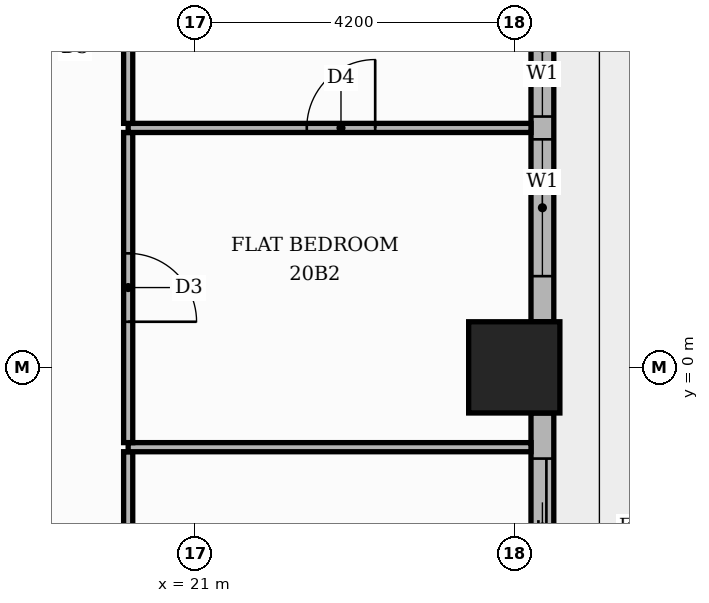
"""IFC4 building model, lengths in metres.
Left out: names, types, materials, properties, quantities, classifications, styles, units other than length and angle.
Written with IfcOpenShell. Run it as: python <this file> out.ifc"""

import sys

from ifc_helpers import new_model, si_unit, direction, frame, frame_2d, origin, origin_2d, place, context, subcontext, project, spatial, rectangle, extrude, element, fill, save


model = new_model("IFC4")
c1 = context("Model", 3, precision=1e-05, world=origin(), true_north=direction((0.0, 1.0)))
c2 = subcontext(c1, "Body", "Model", "MODEL_VIEW")
j1 = project(units=[si_unit("LENGTHUNIT", "METRE"), si_unit("PLANEANGLEUNIT", "RADIAN")], contexts=[c1])
p1 = place(None, origin())
s1 = spatial("IfcSite", under=j1, at=p1, CompositionType="ELEMENT")
p2 = place(p1, origin())
s2 = spatial("IfcBuilding", under=s1, at=p2, CompositionType="ELEMENT")
p3 = place(p2, frame((0.0, 0.0, 87.0)))
s3 = spatial("IfcBuildingStorey", under=s2, at=p3, CompositionType="ELEMENT", Elevation=87.0)
p4 = place(p3, frame((25.2, 0.0, 0.0), z_axis=(0.0, 0.0, 1.0), x_axis=(1.0, 0.0, 0.0)))
e1 = element("IfcColumn", 1, at=p4, inside=s3, PredefinedType="COLUMN", context=c2, shape_type="SweptSolid", body=[
    extrude(rectangle(XDim=1.2, YDim=1.2, at=origin_2d()), origin(), (0.0, 0.0, 1.0), 3.9),
])
p5 = place(p3, frame((25.57, -7.8, 0.0), z_axis=(0.0, 0.0, 1.0), x_axis=(0.0, 1.0, 0.0)))
e2 = element("IfcWall", 2, at=p5, inside=s3, PredefinedType="STANDARD", context=c2, shape_type="SweptSolid", body=[
    extrude(rectangle(XDim=7.2, YDim=0.3, at=frame_2d((3.6, 0.0))), origin(), (0.0, 0.0, 1.0), 3.48),
])
p6 = place(p5, frame((0.6, 0.0, 0.9)))
e3 = element("IfcOpeningElement", 3, at=p6, cuts=e2, PredefinedType="OPENING", context=c2, shape_type="SweptSolid", body=[
    extrude(rectangle(XDim=1.8, YDim=2.1, at=frame_2d((0.9, 1.05))), frame((0.0, 0.16, 0.0), z_axis=(0.0, -1.0, 0.0), x_axis=(1.0, 0.0, 0.0)), (0.0, 0.0, 1.0), 0.32),
])
p7 = place(p5, frame((2.7, 0.0, 0.9)))
e4 = element("IfcOpeningElement", 4, at=p7, cuts=e2, PredefinedType="OPENING", context=c2, shape_type="SweptSolid", body=[
    extrude(rectangle(XDim=1.8, YDim=2.1, at=frame_2d((0.9, 1.05))), frame((0.0, 0.16, 0.0), z_axis=(0.0, -1.0, 0.0), x_axis=(1.0, 0.0, 0.0)), (0.0, 0.0, 1.0), 0.32),
])
p8 = place(p5, frame((4.8, 0.0, 0.0)))
e5 = element("IfcOpeningElement", 5, at=p8, cuts=e2, PredefinedType="OPENING", context=c2, shape_type="SweptSolid", body=[
    extrude(rectangle(XDim=1.8, YDim=2.4, at=frame_2d((0.9, 1.2))), frame((0.0, 0.16, 0.0), z_axis=(0.0, -1.0, 0.0), x_axis=(1.0, 0.0, 0.0)), (0.0, 0.0, 1.0), 0.32),
])
p9 = place(p3, frame((25.57, 0.6, 0.0), z_axis=(0.0, 0.0, 1.0), x_axis=(0.0, 1.0, 0.0)))
e6 = element("IfcWall", 6, at=p9, inside=s3, PredefinedType="STANDARD", context=c2, shape_type="SweptSolid", body=[
    extrude(rectangle(XDim=7.2, YDim=0.3, at=frame_2d((3.6, 0.0))), origin(), (0.0, 0.0, 1.0), 3.48),
])
p10 = place(p9, frame((0.6, 0.0, 0.9)))
e7 = element("IfcOpeningElement", 7, at=p10, cuts=e6, PredefinedType="OPENING", context=c2, shape_type="SweptSolid", body=[
    extrude(rectangle(XDim=1.8, YDim=2.1, at=frame_2d((0.9, 1.05))), frame((0.0, 0.16, 0.0), z_axis=(0.0, -1.0, 0.0), x_axis=(1.0, 0.0, 0.0)), (0.0, 0.0, 1.0), 0.32),
])
p11 = place(p9, frame((2.7, 0.0, 0.9)))
e8 = element("IfcOpeningElement", 8, at=p11, cuts=e6, PredefinedType="OPENING", context=c2, shape_type="SweptSolid", body=[
    extrude(rectangle(XDim=1.8, YDim=2.1, at=frame_2d((0.9, 1.05))), frame((0.0, 0.16, 0.0), z_axis=(0.0, -1.0, 0.0), x_axis=(1.0, 0.0, 0.0)), (0.0, 0.0, 1.0), 0.32),
])
p12 = place(p9, frame((4.8, 0.0, 0.0)))
e9 = element("IfcOpeningElement", 9, at=p12, cuts=e6, PredefinedType="OPENING", context=c2, shape_type="SweptSolid", body=[
    extrude(rectangle(XDim=1.8, YDim=2.4, at=frame_2d((0.9, 1.2))), frame((0.0, 0.16, 0.0), z_axis=(0.0, -1.0, 0.0), x_axis=(1.0, 0.0, 0.0)), (0.0, 0.0, 1.0), 0.32),
])
p13 = place(p3, frame((20.12, -5.15, 0.0), z_axis=(0.0, 0.0, 1.0), x_axis=(0.0, 1.0, 0.0)))
e10 = element("IfcWall", 10, at=p13, inside=s3, PredefinedType="PARTITIONING", context=c2, shape_type="SweptSolid", body=[
    extrude(rectangle(XDim=4.04, YDim=0.12, at=frame_2d((2.02, 0.0))), origin(), (0.0, 0.0, 1.0), 3.48),
])
p14 = place(p13, frame((1.5, 0.0, 0.0)))
e11 = element("IfcOpeningElement", 11, at=p14, cuts=e10, PredefinedType="OPENING", context=c2, shape_type="SweptSolid", body=[
    extrude(rectangle(XDim=1.0, YDim=2.1, at=frame_2d((0.5, 1.05))), frame((0.0, 0.07, 0.0), z_axis=(0.0, -1.0, 0.0), x_axis=(1.0, 0.0, 0.0)), (0.0, 0.0, 1.0), 0.14),
])
p15 = place(p3, frame((20.12, -1.05, 0.0), z_axis=(0.0, 0.0, 1.0), x_axis=(1.0, 0.0, 0.0)))
e12 = element("IfcWall", 12, at=p15, inside=s3, PredefinedType="PARTITIONING", context=c2, shape_type="SweptSolid", body=[
    extrude(rectangle(XDim=5.3, YDim=0.12, at=frame_2d((2.65, 0.0))), origin(), (0.0, 0.0, 1.0), 3.48),
])
p16 = place(p3, frame((20.12, -0.99, 0.0), z_axis=(0.0, 0.0, 1.0), x_axis=(0.0, 1.0, 0.0)))
e13 = element("IfcWall", 13, at=p16, inside=s3, PredefinedType="PARTITIONING", context=c2, shape_type="SweptSolid", body=[
    extrude(rectangle(XDim=4.08, YDim=0.12, at=frame_2d((2.04, 0.0))), origin(), (0.0, 0.0, 1.0), 3.48),
])
p17 = place(p16, frame((1.59, 0.0, 0.0)))
e14 = element("IfcOpeningElement", 14, at=p17, cuts=e13, PredefinedType="OPENING", context=c2, shape_type="SweptSolid", body=[
    extrude(rectangle(XDim=0.9, YDim=2.1, at=frame_2d((0.45, 1.05))), frame((0.0, 0.07, 0.0), z_axis=(0.0, -1.0, 0.0), x_axis=(1.0, 0.0, 0.0)), (0.0, 0.0, 1.0), 0.14),
])
p18 = place(p3, frame((20.12, 3.15, 0.0), z_axis=(0.0, 0.0, 1.0), x_axis=(1.0, 0.0, 0.0)))
e15 = element("IfcWall", 15, at=p18, inside=s3, PredefinedType="PARTITIONING", context=c2, shape_type="SweptSolid", body=[
    extrude(rectangle(XDim=5.3, YDim=0.12, at=frame_2d((2.65, 0.0))), origin(), (0.0, 0.0, 1.0), 3.48),
])
p19 = place(p18, frame((2.35, 0.0, 0.0)))
e16 = element("IfcOpeningElement", 16, at=p19, cuts=e15, PredefinedType="OPENING", context=c2, shape_type="SweptSolid", body=[
    extrude(rectangle(XDim=0.9, YDim=2.1, at=frame_2d((0.45, 1.05))), frame((0.0, 0.07, 0.0), z_axis=(0.0, -1.0, 0.0), x_axis=(1.0, 0.0, 0.0)), (0.0, 0.0, 1.0), 0.14),
])
p20 = place(p3, frame((20.12, 3.21, 0.0), z_axis=(0.0, 0.0, 1.0), x_axis=(0.0, 1.0, 0.0)))
e17 = element("IfcWall", 17, at=p20, inside=s3, PredefinedType="PARTITIONING", context=c2, shape_type="SweptSolid", body=[
    extrude(rectangle(XDim=1.98, YDim=0.12, at=frame_2d((0.99, 0.0))), origin(), (0.0, 0.0, 1.0), 3.48),
])
p21 = place(p8, origin())
e18 = element("IfcDoor", 18, at=p21, inside=s3, OperationType="SLIDING_TO_RIGHT", PredefinedType="DOOR", context=c2, shape_type="SweptSolid", body=[
    extrude(rectangle(XDim=1.8, YDim=2.4, at=frame_2d((0.9, 1.2))), frame((0.0, 0.025, 0.0), z_axis=(0.0, -1.0, 0.0), x_axis=(1.0, 0.0, 0.0)), (0.0, 0.0, 1.0), 0.05),
])
fill(e5, e18)
p22 = place(p10, origin())
e19 = element("IfcWindow", 19, at=p22, inside=s3, PartitioningType="SINGLE_PANEL", PredefinedType="WINDOW", context=c2, shape_type="SweptSolid", body=[
    extrude(rectangle(XDim=1.8, YDim=2.1, at=frame_2d((0.9, 1.05))), frame((0.0, 0.03, 0.0), z_axis=(0.0, -1.0, 0.0), x_axis=(1.0, 0.0, 0.0)), (0.0, 0.0, 1.0), 0.06),
])
fill(e7, e19)
p23 = place(p11, origin())
e20 = element("IfcWindow", 20, at=p23, inside=s3, PartitioningType="SINGLE_PANEL", PredefinedType="WINDOW", context=c2, shape_type="SweptSolid", body=[
    extrude(rectangle(XDim=1.8, YDim=2.1, at=frame_2d((0.9, 1.05))), frame((0.0, 0.03, 0.0), z_axis=(0.0, -1.0, 0.0), x_axis=(1.0, 0.0, 0.0)), (0.0, 0.0, 1.0), 0.06),
])
fill(e8, e20)
p24 = place(p17, frame((0.9, 0.0, 0.0), z_axis=(0.0, 0.0, 1.0), x_axis=(-1.0, 0.0, 0.0)))
e21 = element("IfcDoor", 21, at=p24, inside=s3, OperationType="SINGLE_SWING_LEFT", PredefinedType="DOOR", context=c2, shape_type="SweptSolid", body=[
    extrude(rectangle(XDim=0.9, YDim=2.1, at=frame_2d((0.45, 1.05))), frame((0.0, 0.025, 0.0), z_axis=(0.0, -1.0, 0.0), x_axis=(1.0, 0.0, 0.0)), (0.0, 0.0, 1.0), 0.05),
])
fill(e14, e21)
p25 = place(p19, origin())
e22 = element("IfcDoor", 22, at=p25, inside=s3, OperationType="SINGLE_SWING_RIGHT", PredefinedType="DOOR", context=c2, shape_type="SweptSolid", body=[
    extrude(rectangle(XDim=0.9, YDim=2.1, at=frame_2d((0.45, 1.05))), frame((0.0, 0.025, 0.0), z_axis=(0.0, -1.0, 0.0), x_axis=(1.0, 0.0, 0.0)), (0.0, 0.0, 1.0), 0.05),
])
fill(e16, e22)
save(model, sys.argv[1])
